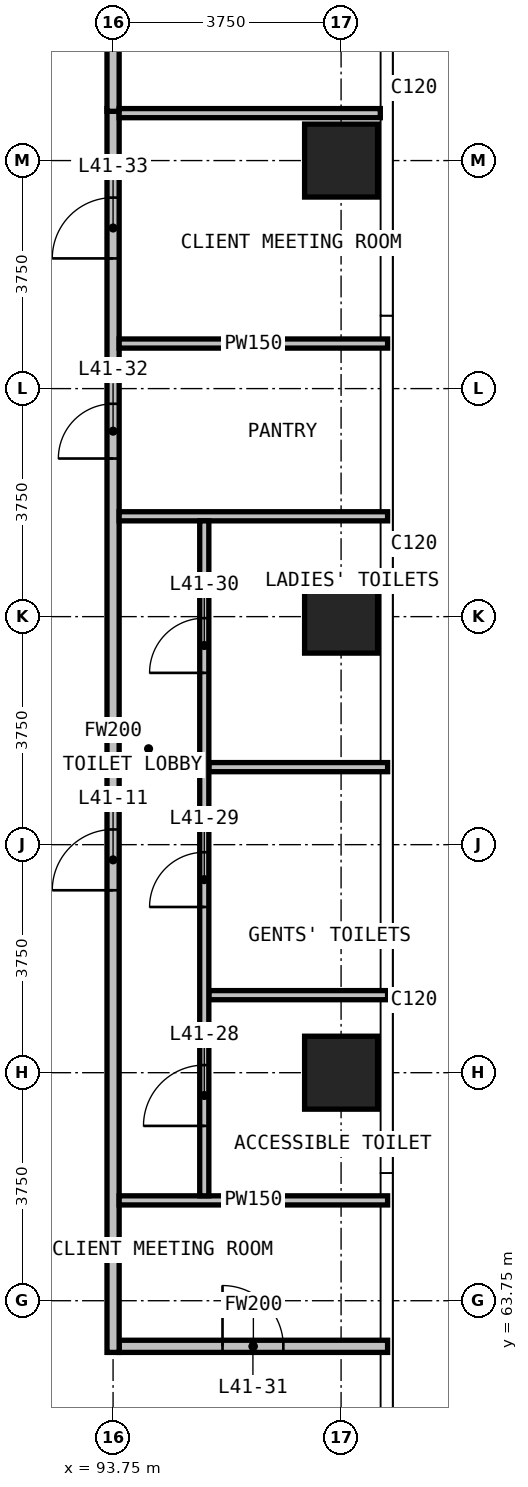
"""IFC4 building model, lengths in metres.
Left out: names, types, materials, properties, quantities, classifications, styles, units other than length and angle.
Written with IfcOpenShell. Run it as: python <this file> out.ifc"""

import sys

from ifc_helpers import new_model, si_unit, direction, frame, frame_2d, origin, origin_2d, place, context, subcontext, project, spatial, rectangle, extrude, element, fill, save


model = new_model("IFC4")
c1 = context("Model", 3, precision=1e-05, world=origin(), true_north=direction((0.0, 1.0)))
c2 = subcontext(c1, "Body", "Model", "MODEL_VIEW")
j1 = project(units=[si_unit("LENGTHUNIT", "METRE"), si_unit("PLANEANGLEUNIT", "RADIAN")], contexts=[c1])
p1 = place(None, origin())
s1 = spatial("IfcSite", under=j1, at=p1, CompositionType="ELEMENT")
p2 = place(p1, origin())
s2 = spatial("IfcBuilding", under=s1, at=p2, CompositionType="ELEMENT")
p3 = place(p2, frame((0.0, 0.0, 162.1)))
s3 = spatial("IfcBuildingStorey", under=s2, at=p3, CompositionType="ELEMENT", Elevation=162.1)
for number, where, z_axis, x_axis in (
    (1, (97.5, 67.5, 0.0), (0.0, 0.0, 1.0), (1.0, 0.0, 0.0)),
    (2, (97.5, 75.0, 0.0), (0.0, 0.0, 1.0), (1.0, 0.0, 0.0)),
    (3, (97.5, 82.5, 0.0), (0.0, 0.0, 1.0), (1.0, 0.0, 0.0)),
):
    element("IfcColumn", number, at=place(p3, frame(where, z_axis=z_axis, x_axis=x_axis)), inside=s3, PredefinedType="COLUMN", context=c2, shape_type="SweptSolid", body=[
        extrude(rectangle(XDim=1.2, YDim=1.2, at=origin_2d()), origin(), (0.0, 0.0, 1.0), 3.6),
    ])
p4 = place(p3, frame((93.85, 63.0, 0.0), z_axis=(0.0, 0.0, 1.0), x_axis=(1.0, 0.0, 0.0)))
e4 = element("IfcWall", 4, at=p4, inside=s3, PredefinedType="PARTITIONING", context=c2, shape_type="SweptSolid", body=[
    extrude(rectangle(XDim=4.415, YDim=0.2, at=frame_2d((2.208, 0.0))), origin(), (0.0, 0.0, 1.0), 3.3),
])
p5 = place(p4, frame((1.7, 0.0, 0.0)))
e5 = element("IfcOpeningElement", 5, at=p5, cuts=e4, PredefinedType="OPENING", context=c2, shape_type="SweptSolid", body=[
    extrude(rectangle(XDim=1.0, YDim=2.2, at=frame_2d((0.5, 1.1))), frame((0.0, 0.11, 0.0), z_axis=(0.0, -1.0, 0.0), x_axis=(1.0, 0.0, 0.0)), (0.0, 0.0, 1.0), 0.22),
])
p6 = place(p3, frame((93.75, 62.9, 0.0), z_axis=(0.0, 0.0, 1.0), x_axis=(0.0, 1.0, 0.0)))
e6 = element("IfcWall", 6, at=p6, inside=s3, PredefinedType="PARTITIONING", context=c2, shape_type="SweptSolid", body=[
    extrude(rectangle(XDim=20.455, YDim=0.2, at=frame_2d((10.228, 0.0))), origin(), (0.0, 0.0, 1.0), 3.3),
])
p7 = place(p6, frame((7.6, 0.0, 0.0)))
e7 = element("IfcOpeningElement", 7, at=p7, cuts=e6, PredefinedType="OPENING", context=c2, shape_type="SweptSolid", body=[
    extrude(rectangle(XDim=1.0, YDim=2.2, at=frame_2d((0.5, 1.1))), frame((0.0, 0.11, 0.0), z_axis=(0.0, -1.0, 0.0), x_axis=(1.0, 0.0, 0.0)), (0.0, 0.0, 1.0), 0.22),
])
p8 = place(p6, frame((14.7, 0.0, 0.0)))
e8 = element("IfcOpeningElement", 8, at=p8, cuts=e6, PredefinedType="OPENING", context=c2, shape_type="SweptSolid", body=[
    extrude(rectangle(XDim=0.9, YDim=2.2, at=frame_2d((0.45, 1.1))), frame((0.0, 0.11, 0.0), z_axis=(0.0, -1.0, 0.0), x_axis=(1.0, 0.0, 0.0)), (0.0, 0.0, 1.0), 0.22),
])
p9 = place(p6, frame((17.991, 0.0, 0.0)))
e9 = element("IfcOpeningElement", 9, at=p9, cuts=e6, PredefinedType="OPENING", context=c2, shape_type="SweptSolid", body=[
    extrude(rectangle(XDim=1.0, YDim=2.2, at=frame_2d((0.5, 1.1))), frame((0.0, 0.11, 0.0), z_axis=(0.0, -1.0, 0.0), x_axis=(1.0, 0.0, 0.0)), (0.0, 0.0, 1.0), 0.22),
])
p10 = place(p3, frame((93.75, 83.31, 0.0), z_axis=(0.0, 0.0, 1.0), x_axis=(0.0, 1.0, 0.0)))
e10 = element("IfcWall", 10, at=p10, inside=s3, PredefinedType="PARTITIONING", context=c2, shape_type="SweptSolid", body=[
    extrude(rectangle(XDim=7.335, YDim=0.2, at=frame_2d((3.667, 0.0))), origin(), (0.0, 0.0, 1.0), 3.3),
])
p11 = place(p3, frame((93.85, 65.4, 0.0), z_axis=(0.0, 0.0, 1.0), x_axis=(1.0, 0.0, 0.0)))
e11 = element("IfcWall", 11, at=p11, inside=s3, PredefinedType="PARTITIONING", context=c2, shape_type="SweptSolid", body=[
    extrude(rectangle(XDim=4.415, YDim=0.15, at=frame_2d((2.208, 0.0))), origin(), (0.0, 0.0, 1.0), 3.3),
])
for number, where, z_axis, x_axis in (
    (12, (95.325, 68.775, 0.0), (0.0, 0.0, 1.0), (1.0, 0.0, 0.0)),
    (13, (95.325, 72.525, 0.0), (0.0, 0.0, 1.0), (1.0, 0.0, 0.0)),
):
    element("IfcWall", number, at=place(p3, frame(where, z_axis=z_axis, x_axis=x_axis)), inside=s3, PredefinedType="PARTITIONING", context=c2, shape_type="SweptSolid", body=[
        extrude(rectangle(XDim=2.94, YDim=0.15, at=frame_2d((1.47, 0.0))), origin(), (0.0, 0.0, 1.0), 3.3),
    ])
for number, where, z_axis, x_axis in (
    (14, (93.85, 76.65, 0.0), (0.0, 0.0, 1.0), (1.0, 0.0, 0.0)),
    (15, (93.85, 79.491, 0.0), (0.0, 0.0, 1.0), (1.0, 0.0, 0.0)),
):
    element("IfcWall", number, at=place(p3, frame(where, z_axis=z_axis, x_axis=x_axis)), inside=s3, PredefinedType="PARTITIONING", context=c2, shape_type="SweptSolid", body=[
        extrude(rectangle(XDim=4.415, YDim=0.15, at=frame_2d((2.208, 0.0))), origin(), (0.0, 0.0, 1.0), 3.3),
    ])
p12 = place(p3, frame((93.85, 83.28, 0.0), z_axis=(0.0, 0.0, 1.0), x_axis=(1.0, 0.0, 0.0)))
e16 = element("IfcWall", 16, at=p12, inside=s3, PredefinedType="PARTITIONING", context=c2, shape_type="SweptSolid", body=[
    extrude(rectangle(XDim=4.295, YDim=0.15, at=frame_2d((2.147, 0.0))), origin(), (0.0, 0.0, 1.0), 3.3),
])
p13 = place(p3, frame((95.25, 65.475, 0.0), z_axis=(0.0, 0.0, 1.0), x_axis=(0.0, 1.0, 0.0)))
e17 = element("IfcWall", 17, at=p13, inside=s3, PredefinedType="PARTITIONING", context=c2, shape_type="SweptSolid", body=[
    extrude(rectangle(XDim=11.1, YDim=0.15, at=frame_2d((5.55, 0.0))), origin(), (0.0, 0.0, 1.0), 3.3),
])
p14 = place(p13, frame((1.15, 0.0, 0.0)))
e18 = element("IfcOpeningElement", 18, at=p14, cuts=e17, PredefinedType="OPENING", context=c2, shape_type="SweptSolid", body=[
    extrude(rectangle(XDim=1.0, YDim=2.2, at=frame_2d((0.5, 1.1))), frame((0.0, 0.085, 0.0), z_axis=(0.0, -1.0, 0.0), x_axis=(1.0, 0.0, 0.0)), (0.0, 0.0, 1.0), 0.17),
])
p15 = place(p13, frame((4.75, 0.0, 0.0)))
e19 = element("IfcOpeningElement", 19, at=p15, cuts=e17, PredefinedType="OPENING", context=c2, shape_type="SweptSolid", body=[
    extrude(rectangle(XDim=0.9, YDim=2.2, at=frame_2d((0.45, 1.1))), frame((0.0, 0.085, 0.0), z_axis=(0.0, -1.0, 0.0), x_axis=(1.0, 0.0, 0.0)), (0.0, 0.0, 1.0), 0.17),
])
p16 = place(p13, frame((8.6, 0.0, 0.0)))
e20 = element("IfcOpeningElement", 20, at=p16, cuts=e17, PredefinedType="OPENING", context=c2, shape_type="SweptSolid", body=[
    extrude(rectangle(XDim=0.9, YDim=2.2, at=frame_2d((0.45, 1.1))), frame((0.0, 0.085, 0.0), z_axis=(0.0, -1.0, 0.0), x_axis=(1.0, 0.0, 0.0)), (0.0, 0.0, 1.0), 0.17),
])
p17 = place(p7, origin())
e21 = element("IfcDoor", 21, at=p17, inside=s3, OperationType="SINGLE_SWING_RIGHT", PredefinedType="DOOR", context=c2, shape_type="SweptSolid", body=[
    extrude(rectangle(XDim=1.0, YDim=2.2, at=frame_2d((0.5, 1.1))), frame((0.0, 0.025, 0.0), z_axis=(0.0, -1.0, 0.0), x_axis=(1.0, 0.0, 0.0)), (0.0, 0.0, 1.0), 0.05),
])
fill(e7, e21)
p18 = place(p14, origin())
e22 = element("IfcDoor", 22, at=p18, inside=s3, OperationType="SINGLE_SWING_LEFT", PredefinedType="DOOR", context=c2, shape_type="SweptSolid", body=[
    extrude(rectangle(XDim=1.0, YDim=2.2, at=frame_2d((0.5, 1.1))), frame((0.0, 0.025, 0.0), z_axis=(0.0, -1.0, 0.0), x_axis=(1.0, 0.0, 0.0)), (0.0, 0.0, 1.0), 0.05),
])
fill(e18, e22)
p19 = place(p15, origin())
e23 = element("IfcDoor", 23, at=p19, inside=s3, OperationType="SINGLE_SWING_LEFT", PredefinedType="DOOR", context=c2, shape_type="SweptSolid", body=[
    extrude(rectangle(XDim=0.9, YDim=2.2, at=frame_2d((0.45, 1.1))), frame((0.0, 0.025, 0.0), z_axis=(0.0, -1.0, 0.0), x_axis=(1.0, 0.0, 0.0)), (0.0, 0.0, 1.0), 0.05),
])
fill(e19, e23)
p20 = place(p16, origin())
e24 = element("IfcDoor", 24, at=p20, inside=s3, OperationType="SINGLE_SWING_LEFT", PredefinedType="DOOR", context=c2, shape_type="SweptSolid", body=[
    extrude(rectangle(XDim=0.9, YDim=2.2, at=frame_2d((0.45, 1.1))), frame((0.0, 0.025, 0.0), z_axis=(0.0, -1.0, 0.0), x_axis=(1.0, 0.0, 0.0)), (0.0, 0.0, 1.0), 0.05),
])
fill(e20, e24)
p21 = place(p5, origin())
e25 = element("IfcDoor", 25, at=p21, inside=s3, OperationType="SINGLE_SWING_LEFT", PredefinedType="DOOR", context=c2, shape_type="SweptSolid", body=[
    extrude(rectangle(XDim=1.0, YDim=2.2, at=frame_2d((0.5, 1.1))), frame((0.0, 0.025, 0.0), z_axis=(0.0, -1.0, 0.0), x_axis=(1.0, 0.0, 0.0)), (0.0, 0.0, 1.0), 0.05),
])
fill(e5, e25)
p22 = place(p8, origin())
e26 = element("IfcDoor", 26, at=p22, inside=s3, OperationType="SINGLE_SWING_RIGHT", PredefinedType="DOOR", context=c2, shape_type="SweptSolid", body=[
    extrude(rectangle(XDim=0.9, YDim=2.2, at=frame_2d((0.45, 1.1))), frame((0.0, 0.025, 0.0), z_axis=(0.0, -1.0, 0.0), x_axis=(1.0, 0.0, 0.0)), (0.0, 0.0, 1.0), 0.05),
])
fill(e8, e26)
p23 = place(p9, origin())
e27 = element("IfcDoor", 27, at=p23, inside=s3, OperationType="SINGLE_SWING_RIGHT", PredefinedType="DOOR", context=c2, shape_type="SweptSolid", body=[
    extrude(rectangle(XDim=1.0, YDim=2.2, at=frame_2d((0.5, 1.1))), frame((0.0, 0.025, 0.0), z_axis=(0.0, -1.0, 0.0), x_axis=(1.0, 0.0, 0.0)), (0.0, 0.0, 1.0), 0.05),
])
fill(e9, e27)
save(model, sys.argv[1])
